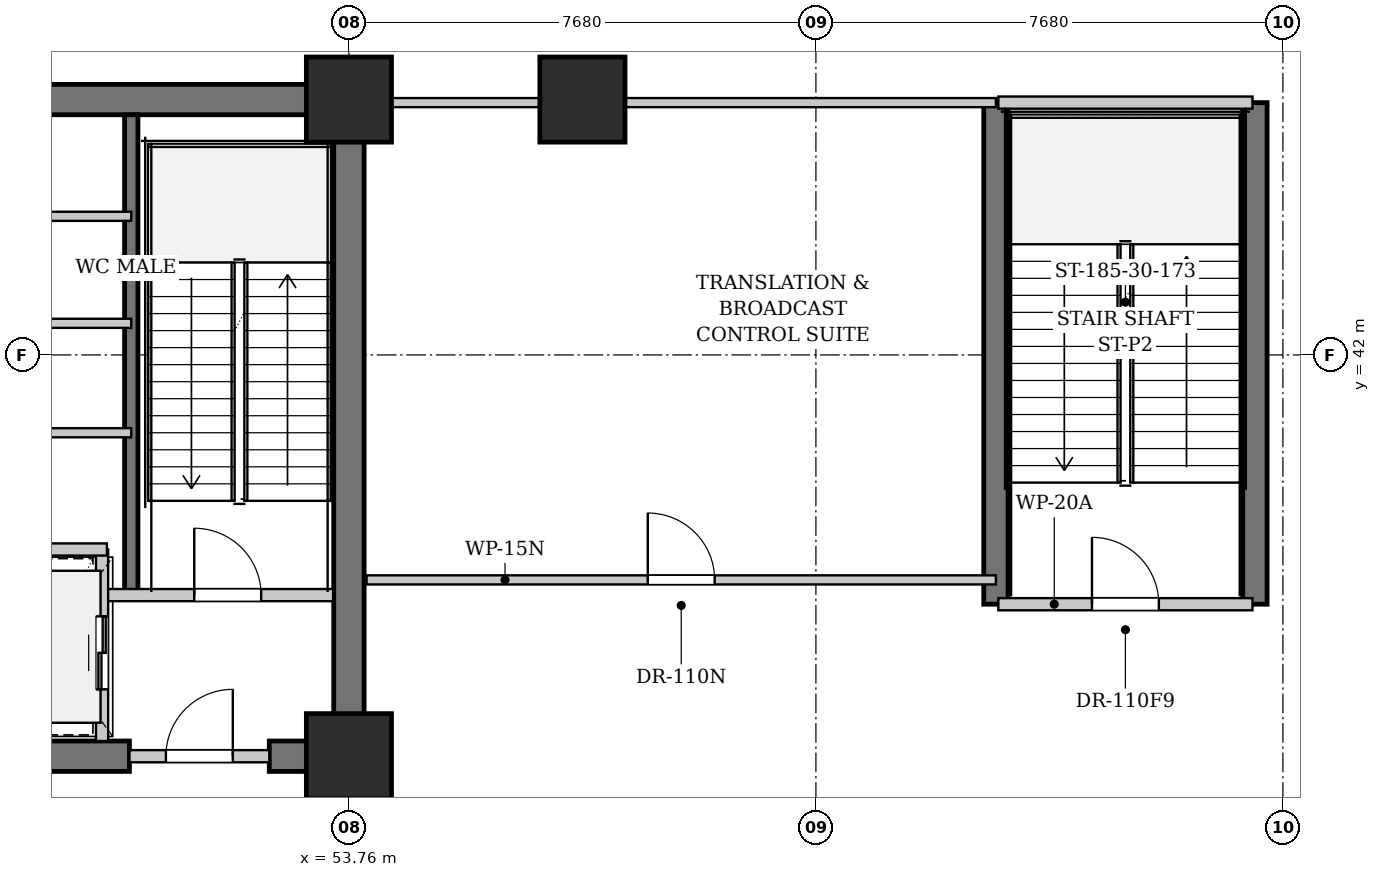
"""IFC4 building model, lengths in metres.
Left out: names, types, materials, properties, quantities, classifications, styles, units other than length and angle.
Written with IfcOpenShell. Run it as: python <this file> out.ifc"""

import sys

from ifc_helpers import new_model, si_unit, direction, frame, frame_2d, origin, origin_2d, place, context, subcontext, project, spatial, rectangle, extrude, element, fill, save


model = new_model("IFC4")
c1 = context("Model", 3, precision=1e-05, world=origin(), true_north=direction((0.0, 1.0)))
c2 = subcontext(c1, "Body", "Model", "MODEL_VIEW")
j1 = project(units=[si_unit("LENGTHUNIT", "METRE"), si_unit("PLANEANGLEUNIT", "RADIAN")], contexts=[c1])
p1 = place(None, origin())
s1 = spatial("IfcSite", under=j1, at=p1, CompositionType="ELEMENT")
p2 = place(p1, origin())
s2 = spatial("IfcBuilding", under=s1, at=p2, CompositionType="ELEMENT")
p3 = place(p2, frame((0.0, 0.0, 10.4)))
s3 = spatial("IfcBuildingStorey", under=s2, at=p3, CompositionType="ELEMENT", Elevation=10.4)
p4 = place(p3, frame((22.79, 46.2, 0.0), z_axis=(0.0, 0.0, 1.0), x_axis=(1.0, 0.0, 0.0)))
e1 = element("IfcWall", 1, at=p4, inside=s3, PredefinedType="SHEAR", context=c2, shape_type="SweptSolid", body=[
    extrude(rectangle(XDim=31.22, YDim=0.5, at=frame_2d((15.61, 0.0))), origin(), (0.0, 0.0, 1.0), 4.94),
])
p5 = place(p3, frame((42.1, 35.4, 0.0), z_axis=(0.0, 0.0, 1.0), x_axis=(1.0, 0.0, 0.0)))
e2 = element("IfcWall", 2, at=p5, inside=s3, PredefinedType="SHEAR", context=c2, shape_type="SweptSolid", body=[
    extrude(rectangle(XDim=8.05, YDim=0.5, at=frame_2d((4.025, 0.0))), origin(), (0.0, 0.0, 1.0), 4.94),
])
p6 = place(p5, frame((4.85, 0.0, 0.0)))
e3 = element("IfcOpeningElement", 3, at=p6, cuts=e2, PredefinedType="OPENING", context=c2, shape_type="SweptSolid", body=[
    extrude(rectangle(XDim=0.9, YDim=2.15, at=frame_2d((0.45, 1.075))), frame((0.0, 0.26, 0.0), z_axis=(0.0, -1.0, 0.0), x_axis=(1.0, 0.0, 0.0)), (0.0, 0.0, 1.0), 0.52),
])
p7 = place(p3, frame((52.45, 35.4, 0.0), z_axis=(0.0, 0.0, 1.0), x_axis=(1.0, 0.0, 0.0)))
e4 = element("IfcWall", 4, at=p7, inside=s3, PredefinedType="SHEAR", context=c2, shape_type="SweptSolid", body=[
    extrude(rectangle(XDim=1.56, YDim=0.5, at=frame_2d((0.78, 0.0))), origin(), (0.0, 0.0, 1.0), 4.94),
])
p8 = place(p3, frame((53.76, 35.65, 0.0), z_axis=(0.0, 0.0, 1.0), x_axis=(0.0, 1.0, 0.0)))
e5 = element("IfcWall", 5, at=p8, inside=s3, PredefinedType="SHEAR", context=c2, shape_type="SweptSolid", body=[
    extrude(rectangle(XDim=10.3, YDim=0.5, at=frame_2d((5.15, 0.0))), origin(), (0.0, 0.0, 1.0), 4.94),
])
p9 = place(p3, frame((50.18, 38.05, 0.0), z_axis=(0.0, 0.0, 1.0), x_axis=(0.0, 1.0, 0.0)))
e6 = element("IfcWall", 6, at=p9, inside=s3, PredefinedType="SHEAR", context=c2, shape_type="SweptSolid", body=[
    extrude(rectangle(XDim=7.9, YDim=0.22, at=frame_2d((3.95, 0.0))), origin(), (0.0, 0.0, 1.0), 4.94),
])
for number, where, z_axis, x_axis in (
    (7, (64.4, 37.9, 0.0), (0.0, 0.0, 1.0), (0.0, 1.0, 0.0)),
    (8, (68.66, 37.9, 0.0), (0.0, 0.0, 1.0), (0.0, 1.0, 0.0)),
):
    element("IfcWall", number, at=place(p3, frame(where, z_axis=z_axis, x_axis=x_axis)), inside=s3, PredefinedType="SHEAR", context=c2, shape_type="SweptSolid", body=[
        extrude(rectangle(XDim=8.25, YDim=0.4, at=frame_2d((4.125, 0.0))), origin(), (0.0, 0.0, 1.0), 4.94),
    ])
for number, where, z_axis, x_axis in (
    (9, (53.76, 35.4, 0.0), (0.0, 0.0, 1.0), (1.0, 0.0, 0.0)),
    (10, (53.76, 46.2, 0.0), (0.0, 0.0, 1.0), (1.0, 0.0, 0.0)),
    (11, (57.6, 46.2, 0.0), (0.0, 0.0, 1.0), (1.0, 0.0, 0.0)),
):
    element("IfcColumn", number, at=place(p3, frame(where, z_axis=z_axis, x_axis=x_axis)), inside=s3, PredefinedType="COLUMN", context=c2, shape_type="SweptSolid", body=[
        extrude(rectangle(XDim=1.4, YDim=1.4, at=origin_2d()), origin(), (0.0, 0.0, 1.0), 5.2),
    ])
p10 = place(p3, frame((49.78, 38.05, 0.0), z_axis=(0.0, 0.0, 1.0), x_axis=(1.0, 0.0, 0.0)))
e12 = element("IfcWall", 12, at=p10, inside=s3, PredefinedType="PARTITIONING", context=c2, shape_type="SweptSolid", body=[
    extrude(rectangle(XDim=3.72, YDim=0.2, at=frame_2d((1.86, 0.0))), origin(), (0.0, 0.0, 1.0), 4.94),
])
p11 = place(p10, frame((1.436, 0.0, 0.0)))
e13 = element("IfcOpeningElement", 13, at=p11, cuts=e12, PredefinedType="OPENING", context=c2, shape_type="SweptSolid", body=[
    extrude(rectangle(XDim=1.1, YDim=2.15, at=frame_2d((0.55, 1.075))), frame((0.0, 0.11, 0.0), z_axis=(0.0, -1.0, 0.0), x_axis=(1.0, 0.0, 0.0)), (0.0, 0.0, 1.0), 0.22),
])
p12 = place(p3, frame((50.15, 35.4, 0.0), z_axis=(0.0, 0.0, 1.0), x_axis=(1.0, 0.0, 0.0)))
e14 = element("IfcWall", 14, at=p12, inside=s3, PredefinedType="PARTITIONING", context=c2, shape_type="SweptSolid", body=[
    extrude(rectangle(XDim=2.3, YDim=0.2, at=frame_2d((1.15, 0.0))), origin(), (0.0, 0.0, 1.0), 4.035),
])
p13 = place(p12, frame((0.6, 0.0, 0.0)))
e15 = element("IfcOpeningElement", 15, at=p13, cuts=e14, PredefinedType="OPENING", context=c2, shape_type="SweptSolid", body=[
    extrude(rectangle(XDim=1.1, YDim=2.15, at=frame_2d((0.55, 1.075))), frame((0.0, 0.11, 0.0), z_axis=(0.0, -1.0, 0.0), x_axis=(1.0, 0.0, 0.0)), (0.0, 0.0, 1.0), 0.22),
])
p14 = place(p3, frame((49.7, 35.65, 0.0), z_axis=(0.0, 0.0, 1.0), x_axis=(0.0, 1.0, 0.0)))
e16 = element("IfcWall", 16, at=p14, inside=s3, PredefinedType="PARTITIONING", context=c2, shape_type="SweptSolid", body=[
    extrude(rectangle(XDim=3.15, YDim=0.2, at=frame_2d((1.575, 0.0))), origin(), (0.0, 0.0, 1.0), 4.94),
])
p15 = place(p14, frame((0.85, 0.0, 0.0)))
e17 = element("IfcOpeningElement", 17, at=p15, cuts=e16, PredefinedType="OPENING", context=c2, shape_type="SweptSolid", body=[
    extrude(rectangle(XDim=1.2, YDim=2.2, at=frame_2d((0.6, 1.1))), frame((0.0, 0.11, 0.0), z_axis=(0.0, -1.0, 0.0), x_axis=(1.0, 0.0, 0.0)), (0.0, 0.0, 1.0), 0.22),
])
p16 = place(p3, frame((47.92, 38.8, 0.0), z_axis=(0.0, 0.0, 1.0), x_axis=(1.0, 0.0, 0.0)))
e18 = element("IfcWall", 18, at=p16, inside=s3, PredefinedType="PARTITIONING", context=c2, shape_type="SweptSolid", body=[
    extrude(rectangle(XDim=1.86, YDim=0.2, at=frame_2d((0.93, 0.0))), origin(), (0.0, 0.0, 1.0), 4.94),
])
for number, where, z_axis, x_axis in (
    (19, (47.88, 40.72, 0.0), (0.0, 0.0, 1.0), (1.0, 0.0, 0.0)),
    (20, (47.88, 42.52, 0.0), (0.0, 0.0, 1.0), (1.0, 0.0, 0.0)),
    (21, (47.88, 44.28, 0.0), (0.0, 0.0, 1.0), (1.0, 0.0, 0.0)),
):
    element("IfcWall", number, at=place(p3, frame(where, z_axis=z_axis, x_axis=x_axis)), inside=s3, PredefinedType="PARTITIONING", context=c2, shape_type="SweptSolid", body=[
        extrude(rectangle(XDim=2.3, YDim=0.15, at=frame_2d((1.15, 0.0))), origin(), (0.0, 0.0, 1.0), 4.94),
    ])
p17 = place(p3, frame((64.44, 37.9, 0.0), z_axis=(0.0, 0.0, 1.0), x_axis=(1.0, 0.0, 0.0)))
e22 = element("IfcWall", 22, at=p17, inside=s3, PredefinedType="PARTITIONING", context=c2, shape_type="SweptSolid", body=[
    extrude(rectangle(XDim=4.18, YDim=0.2, at=frame_2d((2.09, 0.0))), origin(), (0.0, 0.0, 1.0), 4.94),
])
p18 = place(p17, frame((1.54, 0.0, 0.0)))
e23 = element("IfcOpeningElement", 23, at=p18, cuts=e22, PredefinedType="OPENING", context=c2, shape_type="SweptSolid", body=[
    extrude(rectangle(XDim=1.1, YDim=2.15, at=frame_2d((0.55, 1.075))), frame((0.0, 0.11, 0.0), z_axis=(0.0, -1.0, 0.0), x_axis=(1.0, 0.0, 0.0)), (0.0, 0.0, 1.0), 0.22),
])
p19 = place(p3, frame((64.44, 46.15, 0.0), z_axis=(0.0, 0.0, 1.0), x_axis=(1.0, 0.0, 0.0)))
e24 = element("IfcWall", 24, at=p19, inside=s3, PredefinedType="PARTITIONING", context=c2, shape_type="SweptSolid", body=[
    extrude(rectangle(XDim=4.18, YDim=0.2, at=frame_2d((2.09, 0.0))), origin(), (0.0, 0.0, 1.0), 4.94),
])
p20 = place(p3, frame((54.05, 38.3, 0.0), z_axis=(0.0, 0.0, 1.0), x_axis=(1.0, 0.0, 0.0)))
e25 = element("IfcWall", 25, at=p20, inside=s3, PredefinedType="PARTITIONING", context=c2, shape_type="SweptSolid", body=[
    extrude(rectangle(XDim=10.35, YDim=0.15, at=frame_2d((5.175, 0.0))), origin(), (0.0, 0.0, 1.0), 4.94),
])
p21 = place(p20, frame((4.625, 0.0, 0.0)))
e26 = element("IfcOpeningElement", 26, at=p21, cuts=e25, PredefinedType="OPENING", context=c2, shape_type="SweptSolid", body=[
    extrude(rectangle(XDim=1.1, YDim=2.15, at=frame_2d((0.55, 1.075))), frame((0.0, 0.085, 0.0), z_axis=(0.0, -1.0, 0.0), x_axis=(1.0, 0.0, 0.0)), (0.0, 0.0, 1.0), 0.17),
])
p22 = place(p3, frame((54.05, 46.15, 0.0), z_axis=(0.0, 0.0, 1.0), x_axis=(1.0, 0.0, 0.0)))
e27 = element("IfcWall", 27, at=p22, inside=s3, PredefinedType="PARTITIONING", context=c2, shape_type="SweptSolid", body=[
    extrude(rectangle(XDim=10.35, YDim=0.15, at=frame_2d((5.175, 0.0))), origin(), (0.0, 0.0, 1.0), 4.94),
])
p23 = place(p11, origin())
e28 = element("IfcDoor", 28, at=p23, inside=s3, OperationType="SINGLE_SWING_LEFT", PredefinedType="DOOR", context=c2, shape_type="SweptSolid", body=[
    extrude(rectangle(XDim=1.1, YDim=2.15, at=frame_2d((0.55, 1.075))), frame((0.0, 0.025, 0.0), z_axis=(0.0, -1.0, 0.0), x_axis=(1.0, 0.0, 0.0)), (0.0, 0.0, 1.0), 0.05),
])
fill(e13, e28)
p24 = place(p13, origin())
e29 = element("IfcDoor", 29, at=p24, inside=s3, OperationType="SINGLE_SWING_RIGHT", PredefinedType="DOOR", context=c2, shape_type="SweptSolid", body=[
    extrude(rectangle(XDim=1.1, YDim=2.15, at=frame_2d((0.55, 1.075))), frame((0.0, 0.025, 0.0), z_axis=(0.0, -1.0, 0.0), x_axis=(1.0, 0.0, 0.0)), (0.0, 0.0, 1.0), 0.05),
])
fill(e15, e29)
p25 = place(p15, origin())
e30 = element("IfcDoor", 30, at=p25, inside=s3, OperationType="DOUBLE_DOOR_SLIDING", PredefinedType="DOOR", context=c2, shape_type="SweptSolid", body=[
    extrude(rectangle(XDim=1.2, YDim=2.2, at=frame_2d((0.6, 1.1))), frame((0.0, 0.025, 0.0), z_axis=(0.0, -1.0, 0.0), x_axis=(1.0, 0.0, 0.0)), (0.0, 0.0, 1.0), 0.05),
])
fill(e17, e30)
p26 = place(p18, origin())
e31 = element("IfcDoor", 31, at=p26, inside=s3, OperationType="SINGLE_SWING_LEFT", PredefinedType="DOOR", context=c2, shape_type="SweptSolid", body=[
    extrude(rectangle(XDim=1.1, YDim=2.15, at=frame_2d((0.55, 1.075))), frame((0.0, 0.025, 0.0), z_axis=(0.0, -1.0, 0.0), x_axis=(1.0, 0.0, 0.0)), (0.0, 0.0, 1.0), 0.05),
])
fill(e23, e31)
p27 = place(p21, origin())
e32 = element("IfcDoor", 32, at=p27, inside=s3, OperationType="SINGLE_SWING_LEFT", PredefinedType="DOOR", context=c2, shape_type="SweptSolid", body=[
    extrude(rectangle(XDim=1.1, YDim=2.15, at=frame_2d((0.55, 1.075))), frame((0.0, 0.025, 0.0), z_axis=(0.0, -1.0, 0.0), x_axis=(1.0, 0.0, 0.0)), (0.0, 0.0, 1.0), 0.05),
])
fill(e26, e32)
save(model, sys.argv[1])
